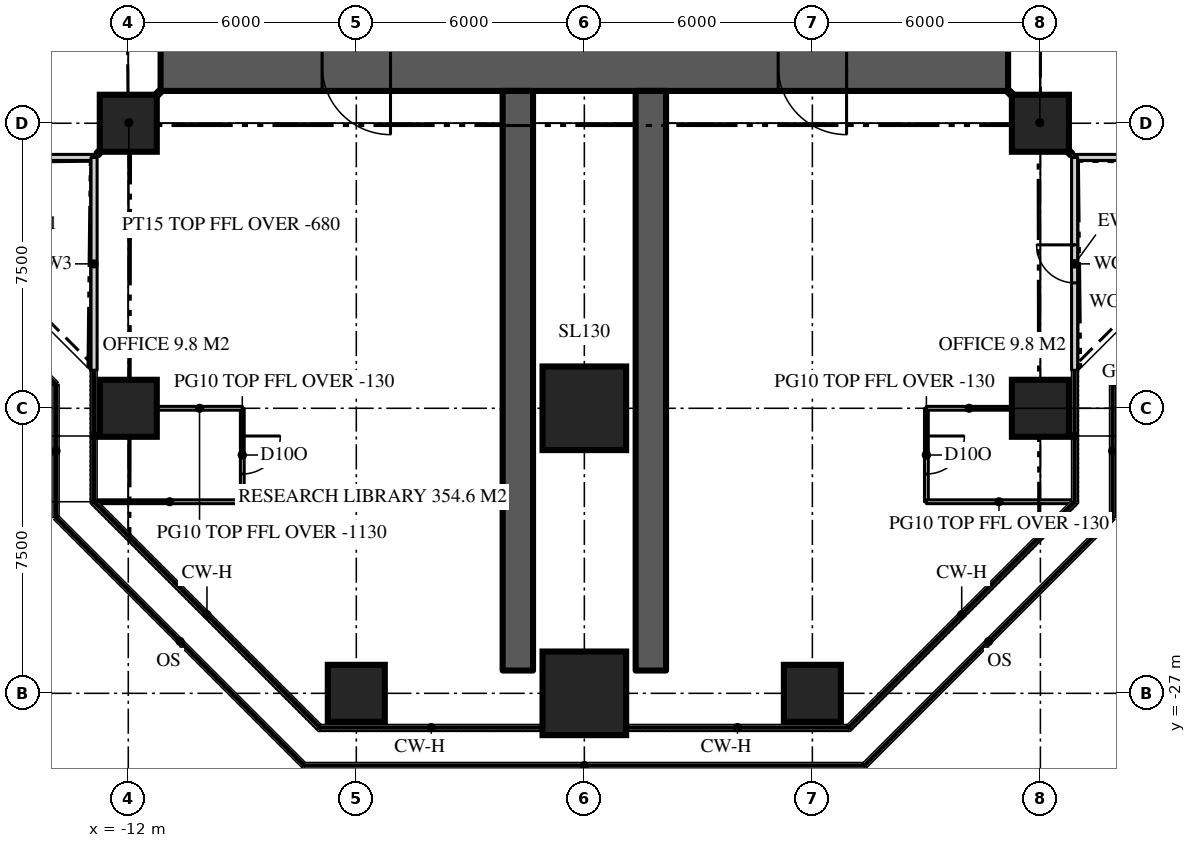
"""IFC4 building model, lengths in metres.
Left out: names, types, materials, properties, quantities, classifications, styles, units other than length and angle.
Written with IfcOpenShell. Run it as: python <this file> out.ifc"""

import sys

from ifc_helpers import new_model, si_unit, direction, frame, frame_2d, origin, origin_2d, place, context, subcontext, project, spatial, rectangle, extrude, element, fill, save


model = new_model("IFC4")
c1 = context("Model", 3, precision=1e-05, world=origin(), true_north=direction((0.0, 1.0)))
c2 = subcontext(c1, "Body", "Model", "MODEL_VIEW")
j1 = project(units=[si_unit("LENGTHUNIT", "METRE"), si_unit("PLANEANGLEUNIT", "RADIAN")], contexts=[c1])
p1 = place(None, origin())
s1 = spatial("IfcSite", under=j1, at=p1, CompositionType="ELEMENT")
p2 = place(p1, origin())
s2 = spatial("IfcBuilding", under=s1, at=p2, CompositionType="ELEMENT")
p3 = place(p2, frame((0.0, 0.0, 236.1)))
s3 = spatial("IfcBuildingStorey", under=s2, at=p3, CompositionType="ELEMENT", Elevation=236.1)
p4 = place(p3, frame((11.15, -10.5, 0.0), z_axis=(0.0, 0.0, 1.0), x_axis=(-1.0, 0.0, 0.0)))
e1 = element("IfcWall", 1, at=p4, inside=s3, PredefinedType="SHEAR", context=c2, shape_type="SweptSolid", body=[
    extrude(rectangle(XDim=22.3, YDim=1.3, at=frame_2d((11.15, 0.0))), origin(), (0.0, 0.0, 1.0), 3.9),
])
p5 = place(p4, frame((16.25, 0.0, 0.0)))
e2 = element("IfcOpeningElement", 2, at=p5, cuts=e1, PredefinedType="OPENING", context=c2, shape_type="SweptSolid", body=[
    extrude(rectangle(XDim=1.8, YDim=2.2, at=frame_2d((0.9, 1.1))), frame((0.0, 0.66, 0.0), z_axis=(0.0, -1.0, 0.0), x_axis=(1.0, 0.0, 0.0)), (0.0, 0.0, 1.0), 1.32),
])
p6 = place(p4, frame((4.25, 0.0, 0.0)))
e3 = element("IfcOpeningElement", 3, at=p6, cuts=e1, PredefinedType="OPENING", context=c2, shape_type="SweptSolid", body=[
    extrude(rectangle(XDim=1.8, YDim=2.2, at=frame_2d((0.9, 1.1))), frame((0.0, 0.66, 0.0), z_axis=(0.0, -1.0, 0.0), x_axis=(1.0, 0.0, 0.0)), (0.0, 0.0, 1.0), 1.32),
])
for number, where, z_axis, x_axis in (
    (4, (-1.75, -11.15, 0.0), (0.0, 0.0, 1.0), (0.0, -1.0, 0.0)),
    (5, (1.75, -11.15, 0.0), (0.0, 0.0, 1.0), (0.0, -1.0, 0.0)),
):
    element("IfcWall", number, at=place(p3, frame(where, z_axis=z_axis, x_axis=x_axis)), inside=s3, PredefinedType="SHEAR", context=c2, shape_type="SweptSolid", body=[
        extrude(rectangle(XDim=15.25, YDim=0.8, at=frame_2d((7.625, 0.0))), origin(), (0.0, 0.0, 1.0), 3.9),
    ])
p7 = place(p3, frame((-6.0, -27.0, 0.0), z_axis=(0.0, 0.0, 1.0), x_axis=(1.0, 0.0, 0.0)))
e6 = element("IfcColumn", 6, at=p7, inside=s3, PredefinedType="COLUMN", context=c2, shape_type="SweptSolid", body=[
    extrude(rectangle(XDim=1.5, YDim=1.5, at=origin_2d()), origin(), (0.0, 0.0, 1.0), 3.9),
])
p8 = place(p3, frame((0.0, -27.0, 0.0), z_axis=(0.0, 0.0, 1.0), x_axis=(1.0, 0.0, 0.0)))
e7 = element("IfcColumn", 7, at=p8, inside=s3, PredefinedType="COLUMN", context=c2, shape_type="SweptSolid", body=[
    extrude(rectangle(XDim=2.2, YDim=2.2, at=origin_2d()), origin(), (0.0, 0.0, 1.0), 3.9),
])
for number, where, z_axis, x_axis in (
    (8, (6.0, -27.0, 0.0), (0.0, 0.0, 1.0), (1.0, 0.0, 0.0)),
    (9, (-12.0, -19.5, 0.0), (0.0, 0.0, 1.0), (1.0, 0.0, 0.0)),
):
    element("IfcColumn", number, at=place(p3, frame(where, z_axis=z_axis, x_axis=x_axis)), inside=s3, PredefinedType="COLUMN", context=c2, shape_type="SweptSolid", body=[
        extrude(rectangle(XDim=1.5, YDim=1.5, at=origin_2d()), origin(), (0.0, 0.0, 1.0), 3.9),
    ])
p9 = place(p3, frame((0.0, -19.5, 0.0), z_axis=(0.0, 0.0, 1.0), x_axis=(1.0, 0.0, 0.0)))
e10 = element("IfcColumn", 10, at=p9, inside=s3, PredefinedType="COLUMN", context=c2, shape_type="SweptSolid", body=[
    extrude(rectangle(XDim=2.2, YDim=2.2, at=origin_2d()), origin(), (0.0, 0.0, 1.0), 3.9),
])
for number, where, z_axis, x_axis in (
    (11, (12.0, -19.5, 0.0), (0.0, 0.0, 1.0), (1.0, 0.0, 0.0)),
    (12, (-12.0, -12.0, 0.0), (0.0, 0.0, 1.0), (1.0, 0.0, 0.0)),
    (13, (12.0, -12.0, 0.0), (0.0, 0.0, 1.0), (1.0, 0.0, 0.0)),
):
    element("IfcColumn", number, at=place(p3, frame(where, z_axis=z_axis, x_axis=x_axis)), inside=s3, PredefinedType="COLUMN", context=c2, shape_type="SweptSolid", body=[
        extrude(rectangle(XDim=1.5, YDim=1.5, at=origin_2d()), origin(), (0.0, 0.0, 1.0), 3.9),
    ])
p10 = place(p3, frame((12.9, -12.9, 0.0), z_axis=(0.0, 0.0, 1.0), x_axis=(1.0, 0.0, 0.0)))
e14 = element("IfcWall", 14, at=p10, inside=s3, PredefinedType="SOLIDWALL", context=c2, shape_type="SweptSolid", body=[
    extrude(rectangle(XDim=5.6, YDim=0.16, at=frame_2d((2.8, 0.0))), origin(), (0.0, 0.0, 1.0), 3.77),
])
p11 = place(p3, frame((-18.5, -12.9, 0.0), z_axis=(0.0, 0.0, 1.0), x_axis=(1.0, 0.0, 0.0)))
e15 = element("IfcWall", 15, at=p11, inside=s3, PredefinedType="SOLIDWALL", context=c2, shape_type="SweptSolid", body=[
    extrude(rectangle(XDim=5.6, YDim=0.16, at=frame_2d((2.8, 0.0))), origin(), (0.0, 0.0, 1.0), 3.77),
])
p12 = place(p11, frame((2.3, 0.0, 0.0)))
e16 = element("IfcOpeningElement", 16, at=p12, cuts=e15, PredefinedType="OPENING", context=c2, shape_type="SweptSolid", body=[
    extrude(rectangle(XDim=1.0, YDim=2.2, at=frame_2d((0.5, 1.1))), frame((0.0, 0.09, 0.0), z_axis=(0.0, -1.0, 0.0), x_axis=(1.0, 0.0, 0.0)), (0.0, 0.0, 1.0), 0.18),
])
p13 = place(p3, frame((-12.9, -12.9, 0.0), z_axis=(0.0, 0.0, 1.0), x_axis=(0.0, -1.0, 0.0)))
e17 = element("IfcWall", 17, at=p13, inside=s3, PredefinedType="SOLIDWALL", context=c2, shape_type="SweptSolid", body=[
    extrude(rectangle(XDim=5.6, YDim=0.16, at=frame_2d((2.8, 0.0))), origin(), (0.0, 0.0, 1.0), 3.77),
])
p14 = place(p3, frame((12.9, -18.5, 0.0), z_axis=(0.0, 0.0, 1.0), x_axis=(0.0, 1.0, 0.0)))
e18 = element("IfcWall", 18, at=p14, inside=s3, PredefinedType="SOLIDWALL", context=c2, shape_type="SweptSolid", body=[
    extrude(rectangle(XDim=5.6, YDim=0.16, at=frame_2d((2.8, 0.0))), origin(), (0.0, 0.0, 1.0), 3.77),
])
p15 = place(p14, frame((2.3, 0.0, 0.0)))
e19 = element("IfcOpeningElement", 19, at=p15, cuts=e18, PredefinedType="OPENING", context=c2, shape_type="SweptSolid", body=[
    extrude(rectangle(XDim=1.0, YDim=2.2, at=frame_2d((0.5, 1.1))), frame((0.0, 0.09, 0.0), z_axis=(0.0, -1.0, 0.0), x_axis=(1.0, 0.0, 0.0)), (0.0, 0.0, 1.0), 0.18),
])
p16 = place(p3, frame((9.0, -19.5, 0.0), z_axis=(0.0, 0.0, 1.0), x_axis=(0.0, -1.0, 0.0)))
e20 = element("IfcWall", 20, at=p16, inside=s3, PredefinedType="PARTITIONING", context=c2, shape_type="SweptSolid", body=[
    extrude(rectangle(XDim=2.459, YDim=0.1, at=frame_2d((1.229, 0.0))), origin(), (0.0, 0.0, 1.0), 3.77),
])
p17 = place(p16, frame((0.729, 0.0, 0.0)))
e21 = element("IfcOpeningElement", 21, at=p17, cuts=e20, PredefinedType="OPENING", context=c2, shape_type="SweptSolid", body=[
    extrude(rectangle(XDim=1.0, YDim=2.2, at=frame_2d((0.5, 1.1))), frame((0.0, 0.06, 0.0), z_axis=(0.0, -1.0, 0.0), x_axis=(1.0, 0.0, 0.0)), (0.0, 0.0, 1.0), 0.12),
])
p18 = place(p3, frame((9.0, -19.5, 0.0), z_axis=(0.0, 0.0, 1.0), x_axis=(1.0, 0.0, 0.0)))
e22 = element("IfcWall", 22, at=p18, inside=s3, PredefinedType="PARTITIONING", context=c2, shape_type="SweptSolid", body=[
    extrude(rectangle(XDim=2.25, YDim=0.1, at=frame_2d((1.125, 0.0))), origin(), (0.0, 0.0, 1.0), 2.77),
])
p19 = place(p3, frame((9.0, -21.959, 0.0), z_axis=(0.0, 0.0, 1.0), x_axis=(1.0, 0.0, 0.0)))
e23 = element("IfcWall", 23, at=p19, inside=s3, PredefinedType="PARTITIONING", context=c2, shape_type="SweptSolid", body=[
    extrude(rectangle(XDim=3.82, YDim=0.1, at=frame_2d((1.91, 0.0))), origin(), (0.0, 0.0, 1.0), 3.77),
])
p20 = place(p3, frame((-9.0, -19.5, 0.0), z_axis=(0.0, 0.0, 1.0), x_axis=(0.0, -1.0, 0.0)))
e24 = element("IfcWall", 24, at=p20, inside=s3, PredefinedType="PARTITIONING", context=c2, shape_type="SweptSolid", body=[
    extrude(rectangle(XDim=2.459, YDim=0.1, at=frame_2d((1.229, 0.0))), origin(), (0.0, 0.0, 1.0), 3.77),
])
p21 = place(p20, frame((0.729, 0.0, 0.0)))
e25 = element("IfcOpeningElement", 25, at=p21, cuts=e24, PredefinedType="OPENING", context=c2, shape_type="SweptSolid", body=[
    extrude(rectangle(XDim=1.0, YDim=2.2, at=frame_2d((0.5, 1.1))), frame((0.0, 0.06, 0.0), z_axis=(0.0, -1.0, 0.0), x_axis=(1.0, 0.0, 0.0)), (0.0, 0.0, 1.0), 0.12),
])
p22 = place(p3, frame((-9.0, -19.5, 0.0), z_axis=(0.0, 0.0, 1.0), x_axis=(-1.0, 0.0, 0.0)))
e26 = element("IfcWall", 26, at=p22, inside=s3, PredefinedType="PARTITIONING", context=c2, shape_type="SweptSolid", body=[
    extrude(rectangle(XDim=2.25, YDim=0.1, at=frame_2d((1.125, 0.0))), origin(), (0.0, 0.0, 1.0), 2.77),
])
p23 = place(p3, frame((-9.0, -21.959, 0.0), z_axis=(0.0, 0.0, 1.0), x_axis=(-1.0, 0.0, 0.0)))
e27 = element("IfcWall", 27, at=p23, inside=s3, PredefinedType="PARTITIONING", context=c2, shape_type="SweptSolid", body=[
    extrude(rectangle(XDim=3.82, YDim=0.1, at=frame_2d((1.91, 0.0))), origin(), (0.0, 0.0, 1.0), 3.77),
])
for number, where, z_axis, x_axis in (
    (28, (-11.15, -11.15, 0.0), (0.0, 0.0, 1.0), (-0.707, -0.707, 0.0)),
    (29, (11.15, -11.15, 0.0), (0.0, 0.0, 1.0), (0.707, -0.707, 0.0)),
):
    element("IfcWall", number, at=place(p3, frame(where, z_axis=z_axis, x_axis=x_axis)), inside=s3, PredefinedType="PARTITIONING", context=c2, shape_type="SweptSolid", body=[
        extrude(rectangle(XDim=2.362, YDim=0.15, at=frame_2d((1.181, 0.0))), origin(), (0.0, 0.0, 1.0), 3.22),
    ])
p24 = place(p15, origin())
e30 = element("IfcDoor", 30, at=p24, inside=s3, OperationType="SINGLE_SWING_RIGHT", PredefinedType="DOOR", context=c2, shape_type="SweptSolid", body=[
    extrude(rectangle(XDim=1.0, YDim=2.2, at=frame_2d((0.5, 1.1))), frame((0.0, 0.025, 0.0), z_axis=(0.0, -1.0, 0.0), x_axis=(1.0, 0.0, 0.0)), (0.0, 0.0, 1.0), 0.05),
])
fill(e19, e30)
p25 = place(p5, origin())
e31 = element("IfcDoor", 31, at=p25, inside=s3, OperationType="DOUBLE_DOOR_DOUBLE_SWING", PredefinedType="DOOR", context=c2, shape_type="SweptSolid", body=[
    extrude(rectangle(XDim=1.8, YDim=2.2, at=frame_2d((0.9, 1.1))), frame((0.0, 0.025, 0.0), z_axis=(0.0, -1.0, 0.0), x_axis=(1.0, 0.0, 0.0)), (0.0, 0.0, 1.0), 0.05),
])
fill(e2, e31)
p26 = place(p6, origin())
e32 = element("IfcDoor", 32, at=p26, inside=s3, OperationType="DOUBLE_DOOR_DOUBLE_SWING", PredefinedType="DOOR", context=c2, shape_type="SweptSolid", body=[
    extrude(rectangle(XDim=1.8, YDim=2.2, at=frame_2d((0.9, 1.1))), frame((0.0, 0.025, 0.0), z_axis=(0.0, -1.0, 0.0), x_axis=(1.0, 0.0, 0.0)), (0.0, 0.0, 1.0), 0.05),
])
fill(e3, e32)
p27 = place(p17, origin())
e33 = element("IfcDoor", 33, at=p27, inside=s3, OperationType="SINGLE_SWING_LEFT", PredefinedType="DOOR", context=c2, shape_type="SweptSolid", body=[
    extrude(rectangle(XDim=1.0, YDim=2.2, at=frame_2d((0.5, 1.1))), frame((0.0, 0.025, 0.0), z_axis=(0.0, -1.0, 0.0), x_axis=(1.0, 0.0, 0.0)), (0.0, 0.0, 1.0), 0.05),
])
fill(e21, e33)
p28 = place(p21, origin())
e34 = element("IfcDoor", 34, at=p28, inside=s3, OperationType="SINGLE_SWING_LEFT", PredefinedType="DOOR", context=c2, shape_type="SweptSolid", body=[
    extrude(rectangle(XDim=1.0, YDim=2.2, at=frame_2d((0.5, 1.1))), frame((0.0, 0.025, 0.0), z_axis=(0.0, -1.0, 0.0), x_axis=(1.0, 0.0, 0.0)), (0.0, 0.0, 1.0), 0.05),
])
fill(e25, e34)
save(model, sys.argv[1])
